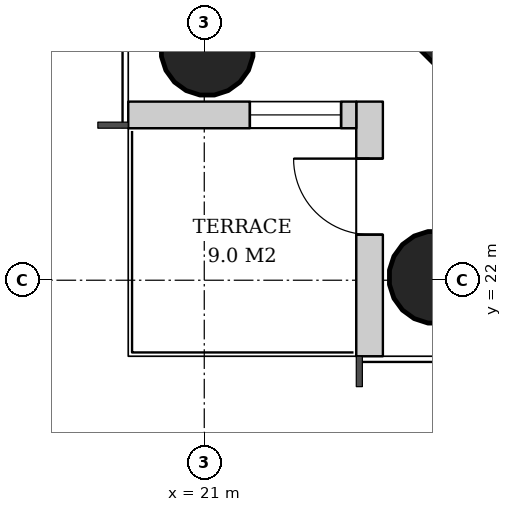
"""IFC4 building model, lengths in metres.
Left out: names, types, materials, properties, quantities, classifications, styles, units other than length and angle.
Written with IfcOpenShell. Run it as: python <this file> out.ifc"""

import sys

from ifc_helpers import new_model, si_unit, direction, frame, frame_2d, origin, origin_2d, place, context, subcontext, project, spatial, rectangle, hollow_circle, extrude, element, fill, save


model = new_model("IFC4")
c1 = context("Model", 3, precision=1e-05, world=origin(), true_north=direction((0.0, 1.0)))
c2 = subcontext(c1, "Body", "Model", "MODEL_VIEW")
j1 = project(units=[si_unit("LENGTHUNIT", "METRE"), si_unit("PLANEANGLEUNIT", "RADIAN")], contexts=[c1])
p1 = place(None, origin())
s1 = spatial("IfcSite", under=j1, at=p1, CompositionType="ELEMENT")
p2 = place(p1, origin())
s2 = spatial("IfcBuilding", under=s1, at=p2, CompositionType="ELEMENT")
p3 = place(p2, frame((0.0, 0.0, 21.0)))
s3 = spatial("IfcBuildingStorey", under=s2, at=p3, CompositionType="ELEMENT", Elevation=21.0)
p4 = place(p3, frame((25.103, 26.103, 0.078), z_axis=(0.031908173233, 0.031908173233, 0.998981349657), x_axis=(-0.707106781187, 0.707106781187, 0.0)))
e1 = element("IfcColumn", 1, at=p4, inside=s3, PredefinedType="COLUMN", context=c2, shape_type="SweptSolid", body=[
    extrude(rectangle(XDim=3.4, YDim=3.4, at=origin_2d()), origin(), (0.0, 0.0, 1.0), 3.726),
])
for number, where, z_axis, x_axis in (
    (2, (21.001, 25.001, 0.04), (0.032, 0.032, 0.999), (-0.707, 0.707, 0.0)),
    (3, (24.001, 22.001, 0.04), (0.032, 0.032, 0.999), (-0.707, 0.707, 0.0)),
):
    element("IfcColumn", number, at=place(p3, frame(where, z_axis=z_axis, x_axis=x_axis)), inside=s3, PredefinedType="COLUMN", context=c2, shape_type="SweptSolid", body=[
        extrude(hollow_circle(Radius=0.61, WallThickness=0.04, at=origin_2d()), origin(), (0.0, 0.0, 1.0), 3.764),
    ])
p5 = place(p3, frame((23.175, 21.0, 0.0), z_axis=(0.0, 0.0, 1.0), x_axis=(0.0, 1.0, 0.0)))
e4 = element("IfcWall", 4, at=p5, inside=s3, PredefinedType="SOLIDWALL", context=c2, shape_type="SweptSolid", body=[
    extrude(rectangle(XDim=3.35, YDim=0.35, at=frame_2d((1.675, 0.0))), origin(), (0.0, 0.0, 1.0), 3.62),
])
p6 = place(p5, frame((1.6, 0.0, 0.0)))
e5 = element("IfcOpeningElement", 5, at=p6, cuts=e4, PredefinedType="OPENING", context=c2, shape_type="SweptSolid", body=[
    extrude(rectangle(XDim=1.0, YDim=2.4, at=frame_2d((0.5, 1.2))), frame((0.0, 0.185, 0.0), z_axis=(0.0, -1.0, 0.0), x_axis=(1.0, 0.0, 0.0)), (0.0, 0.0, 1.0), 0.37),
])
p7 = place(p3, frame((23.0, 24.175, 0.0), z_axis=(0.0, 0.0, 1.0), x_axis=(-1.0, 0.0, 0.0)))
e6 = element("IfcWall", 6, at=p7, inside=s3, PredefinedType="SOLIDWALL", context=c2, shape_type="SweptSolid", body=[
    extrude(rectangle(XDim=3.0, YDim=0.35, at=frame_2d((1.5, 0.0))), origin(), (0.0, 0.0, 1.0), 3.62),
])
p8 = place(p7, frame((0.2, 0.0, 0.6)))
e7 = element("IfcOpeningElement", 7, at=p8, cuts=e6, PredefinedType="OPENING", context=c2, shape_type="SweptSolid", body=[
    extrude(rectangle(XDim=1.2, YDim=2.55, at=frame_2d((0.6, 1.275))), frame((0.0, 0.185, 0.0), z_axis=(0.0, -1.0, 0.0), x_axis=(1.0, 0.0, 0.0)), (0.0, 0.0, 1.0), 0.37),
])
p9 = place(p6, origin())
e8 = element("IfcDoor", 8, at=p9, inside=s3, OperationType="SINGLE_SWING_RIGHT", PredefinedType="DOOR", context=c2, shape_type="SweptSolid", body=[
    extrude(rectangle(XDim=1.0, YDim=2.4, at=frame_2d((0.5, 1.2))), frame((0.0, 0.025, 0.0), z_axis=(0.0, -1.0, 0.0), x_axis=(1.0, 0.0, 0.0)), (0.0, 0.0, 1.0), 0.05),
])
fill(e5, e8)
p10 = place(p8, origin())
e9 = element("IfcWindow", 9, at=p10, inside=s3, PartitioningType="SINGLE_PANEL", PredefinedType="WINDOW", context=c2, shape_type="SweptSolid", body=[
    extrude(rectangle(XDim=1.2, YDim=2.55, at=frame_2d((0.6, 1.275))), frame((0.0, 0.03, 0.0), z_axis=(0.0, -1.0, 0.0), x_axis=(1.0, 0.0, 0.0)), (0.0, 0.0, 1.0), 0.06),
])
fill(e7, e9)
save(model, sys.argv[1])
